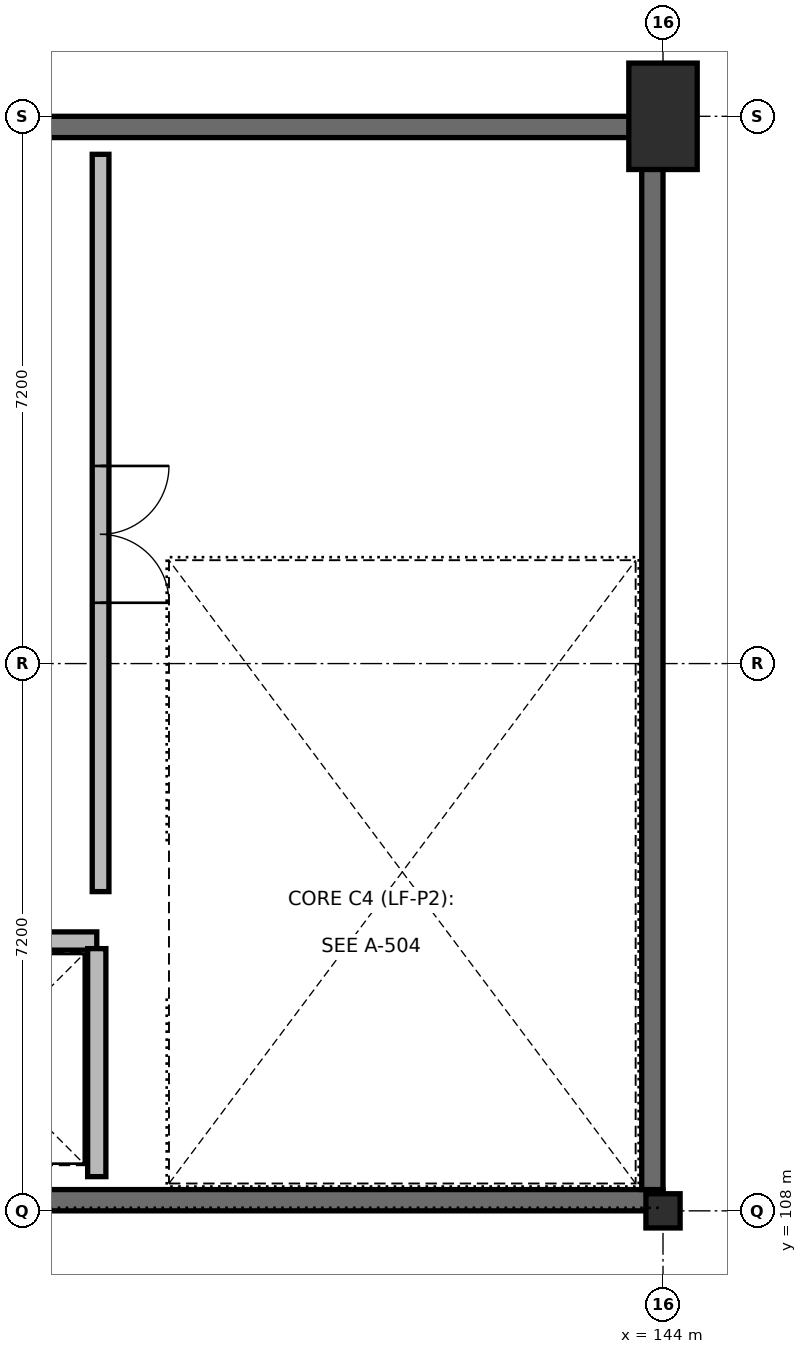
"""IFC4 building model, lengths in metres.
Left out: names, types, materials, properties, quantities, classifications, styles, units other than length and angle.
Written with IfcOpenShell. Run it as: python <this file> out.ifc"""

import sys

from ifc_helpers import new_model, si_unit, direction, frame, frame_2d, origin, origin_2d, place, context, subcontext, project, spatial, rectangle, extrude, element, fill, save


model = new_model("IFC4")
c1 = context("Model", 3, precision=1e-05, world=origin(), true_north=direction((0.0, 1.0)))
c2 = subcontext(c1, "Body", "Model", "MODEL_VIEW")
j1 = project(units=[si_unit("LENGTHUNIT", "METRE"), si_unit("PLANEANGLEUNIT", "RADIAN")], contexts=[c1])
p1 = place(None, origin())
s1 = spatial("IfcSite", under=j1, at=p1, CompositionType="ELEMENT")
p2 = place(p1, origin())
s2 = spatial("IfcBuilding", under=s1, at=p2, CompositionType="ELEMENT")
p3 = place(p2, frame((0.0, 0.0, 9.6)))
s3 = spatial("IfcBuildingStorey", under=s2, at=p3, CompositionType="ELEMENT", Elevation=9.6)
p4 = place(p3, frame((144.0, 122.4, 0.0), z_axis=(0.0, 0.0, 1.0), x_axis=(1.0, 0.0, 0.0)))
e1 = element("IfcColumn", 1, at=p4, inside=s3, PredefinedType="COLUMN", context=c2, shape_type="SweptSolid", body=[
    extrude(rectangle(XDim=0.9, YDim=1.4, at=origin_2d()), origin(), (0.0, 0.0, 1.0), 4.225),
])
p5 = place(p3, frame((144.0, 108.0, 0.0), z_axis=(0.0, 0.0, 1.0), x_axis=(1.0, 0.0, 0.0)))
e2 = element("IfcColumn", 2, at=p5, inside=s3, PredefinedType="COLUMN", context=c2, shape_type="SweptSolid", body=[
    extrude(rectangle(XDim=0.45, YDim=0.45, at=origin_2d()), origin(), (0.0, 0.0, 1.0), 4.5),
])
for number, where, z_axis, x_axis in (
    (3, (133.2, 108.14, 0.0), (0.0, 0.0, 1.0), (1.0, 0.0, 0.0)),
    (4, (133.2, 122.26, 0.0), (0.0, 0.0, 1.0), (1.0, 0.0, 0.0)),
):
    element("IfcWall", number, at=place(p3, frame(where, z_axis=z_axis, x_axis=x_axis)), inside=s3, PredefinedType="SHEAR", context=c2, shape_type="SweptSolid", body=[
        extrude(rectangle(XDim=10.8, YDim=0.28, at=frame_2d((5.4, 0.0))), origin(), (0.0, 0.0, 1.0), 4.5),
    ])
p6 = place(p3, frame((143.86, 108.28, 0.0), z_axis=(0.0, 0.0, 1.0), x_axis=(0.0, 1.0, 0.0)))
e5 = element("IfcWall", 5, at=p6, inside=s3, PredefinedType="SHEAR", context=c2, shape_type="SweptSolid", body=[
    extrude(rectangle(XDim=13.84, YDim=0.28, at=frame_2d((6.92, 0.0))), origin(), (0.0, 0.0, 1.0), 4.5),
])
p7 = place(p3, frame((136.6, 112.2, 0.0), z_axis=(0.0, 0.0, 1.0), x_axis=(0.0, 1.0, 0.0)))
e6 = element("IfcWall", 6, at=p7, inside=s3, PredefinedType="PARTITIONING", context=c2, shape_type="SweptSolid", body=[
    extrude(rectangle(XDim=9.7, YDim=0.22, at=frame_2d((4.85, 0.0))), origin(), (0.0, 0.0, 1.0), 4.205),
])
p8 = place(p7, frame((3.8, 0.0, 0.0)))
e7 = element("IfcOpeningElement", 7, at=p8, cuts=e6, PredefinedType="OPENING", context=c2, shape_type="SweptSolid", body=[
    extrude(rectangle(XDim=1.8, YDim=2.2, at=frame_2d((0.9, 1.1))), frame((0.0, 0.12, 0.0), z_axis=(0.0, -1.0, 0.0), x_axis=(1.0, 0.0, 0.0)), (0.0, 0.0, 1.0), 0.24),
])
p9 = place(p3, frame((133.53, 111.55, 0.0), z_axis=(0.0, 0.0, 1.0), x_axis=(1.0, 0.0, 0.0)))
e8 = element("IfcWall", 8, at=p9, inside=s3, PredefinedType="SOLIDWALL", context=c2, shape_type="SweptSolid", body=[
    extrude(rectangle(XDim=3.02, YDim=0.24, at=frame_2d((1.51, 0.0))), origin(), (0.0, 0.0, 1.0), 2.65),
])
p10 = place(p9, frame((0.96, 0.0, 0.0)))
e9 = element("IfcOpeningElement", 9, at=p10, cuts=e8, PredefinedType="OPENING", context=c2, shape_type="SweptSolid", body=[
    extrude(rectangle(XDim=1.1, YDim=2.15, at=frame_2d((0.55, 1.075))), frame((0.0, 0.13, 0.0), z_axis=(0.0, -1.0, 0.0), x_axis=(1.0, 0.0, 0.0)), (0.0, 0.0, 1.0), 0.26),
])
p11 = place(p3, frame((136.55, 108.45, 0.0), z_axis=(0.0, 0.0, 1.0), x_axis=(0.0, 1.0, 0.0)))
e10 = element("IfcWall", 10, at=p11, inside=s3, PredefinedType="SOLIDWALL", context=c2, shape_type="SweptSolid", body=[
    extrude(rectangle(XDim=3.0, YDim=0.24, at=frame_2d((1.5, 0.0))), origin(), (0.0, 0.0, 1.0), 4.205),
])
p12 = place(p8, origin())
e11 = element("IfcDoor", 11, at=p12, inside=s3, OperationType="DOUBLE_DOOR_SINGLE_SWING", PredefinedType="DOOR", context=c2, shape_type="SweptSolid", body=[
    extrude(rectangle(XDim=1.8, YDim=2.2, at=frame_2d((0.9, 1.1))), frame((0.0, 0.025, 0.0), z_axis=(0.0, -1.0, 0.0), x_axis=(1.0, 0.0, 0.0)), (0.0, 0.0, 1.0), 0.05),
])
fill(e7, e11)
save(model, sys.argv[1])
